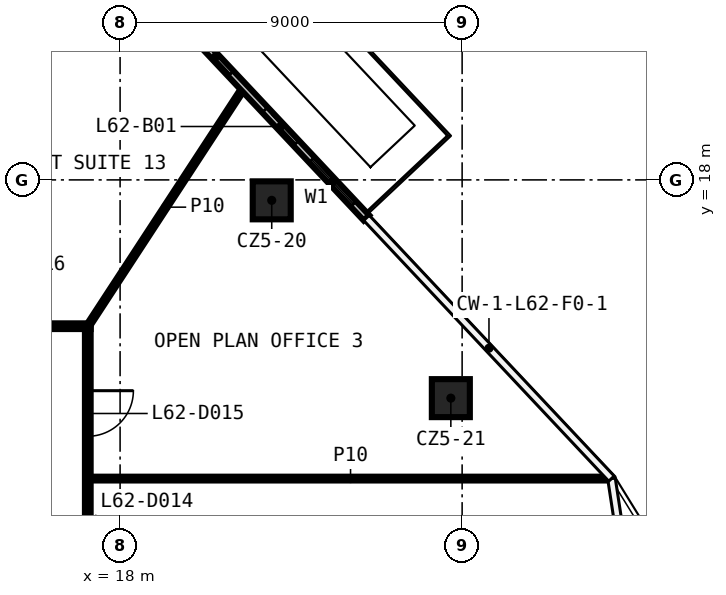
"""IFC4 building model, lengths in metres.
Left out: names, types, materials, properties, quantities, classifications, styles, units other than length and angle.
Written with IfcOpenShell. Run it as: python <this file> out.ifc"""

import sys

from ifc_helpers import new_model, si_unit, direction, frame, frame_2d, origin, origin_2d, place, context, subcontext, project, spatial, rectangle, extrude, element, fill, save


model = new_model("IFC4")
c1 = context("Model", 3, precision=1e-05, world=origin(), true_north=direction((0.0, 1.0)))
c2 = subcontext(c1, "Body", "Model", "MODEL_VIEW")
j1 = project(units=[si_unit("LENGTHUNIT", "METRE"), si_unit("PLANEANGLEUNIT", "RADIAN")], contexts=[c1])
p1 = place(None, origin())
s1 = spatial("IfcSite", under=j1, at=p1, CompositionType="ELEMENT")
p2 = place(p1, origin())
s2 = spatial("IfcBuilding", under=s1, at=p2, CompositionType="ELEMENT")
p3 = place(p2, frame((0.0, 0.0, 294.2)))
s3 = spatial("IfcBuildingStorey", under=s2, at=p3, CompositionType="ELEMENT", Elevation=294.2)
for number, where, z_axis, x_axis in (
    (1, (21.99, 17.462, 0.0), (0.0, 0.0, 1.0), (1.0, 0.0, 0.0)),
    (2, (26.703, 12.257, 0.0), (0.0, 0.0, 1.0), (1.0, 0.0, 0.0)),
):
    element("IfcColumn", number, at=place(p3, frame(where, z_axis=z_axis, x_axis=x_axis)), inside=s3, PredefinedType="COLUMN", context=c2, shape_type="SweptSolid", body=[
        extrude(rectangle(XDim=1.0, YDim=1.0, at=origin_2d()), origin(), (0.0, 0.0, 1.0), 3.82),
    ])
p4 = place(p3, frame((17.225, 10.14, 0.0), z_axis=(0.0, 0.0, 1.0), x_axis=(1.0, 0.0, 0.0)))
e3 = element("IfcWall", 3, at=p4, inside=s3, PredefinedType="PARTITIONING", context=c2, shape_type="SweptSolid", body=[
    extrude(rectangle(XDim=13.677, YDim=0.1, at=frame_2d((6.839, 0.0))), origin(), (0.0, 0.0, 1.0), 3.82),
])
p5 = place(p3, frame((-17.225, 14.15, 0.0), z_axis=(0.0, 0.0, 1.0), x_axis=(1.0, 0.0, 0.0)))
e4 = element("IfcWall", 4, at=p5, inside=s3, PredefinedType="PARTITIONING", context=c2, shape_type="SweptSolid", body=[
    extrude(rectangle(XDim=34.45, YDim=0.15, at=frame_2d((17.225, 0.0))), origin(), (0.0, 0.0, 1.0), 3.82),
])
p6 = place(p5, frame((31.962, 0.0, 0.0)))
e5 = element("IfcOpeningElement", 5, at=p6, cuts=e4, PredefinedType="OPENING", context=c2, shape_type="SweptSolid", body=[
    extrude(rectangle(XDim=1.2, YDim=2.1, at=frame_2d((0.6, 1.05))), frame((0.0, 0.085, 0.0), z_axis=(0.0, -1.0, 0.0), x_axis=(1.0, 0.0, 0.0)), (0.0, 0.0, 1.0), 0.17),
])
p7 = place(p5, frame((26.254, 0.0, 0.0)))
e6 = element("IfcOpeningElement", 6, at=p7, cuts=e4, PredefinedType="OPENING", context=c2, shape_type="SweptSolid", body=[
    extrude(rectangle(XDim=1.2, YDim=2.1, at=frame_2d((0.6, 1.05))), frame((0.0, 0.085, 0.0), z_axis=(0.0, -1.0, 0.0), x_axis=(1.0, 0.0, 0.0)), (0.0, 0.0, 1.0), 0.17),
])
p8 = place(p5, frame((20.032, 0.0, 0.0)))
e7 = element("IfcOpeningElement", 7, at=p8, cuts=e4, PredefinedType="OPENING", context=c2, shape_type="SweptSolid", body=[
    extrude(rectangle(XDim=1.2, YDim=2.1, at=frame_2d((0.6, 1.05))), frame((0.0, 0.085, 0.0), z_axis=(0.0, -1.0, 0.0), x_axis=(1.0, 0.0, 0.0)), (0.0, 0.0, 1.0), 0.17),
])
p9 = place(p5, frame((15.378, 0.0, 0.0)))
e8 = element("IfcOpeningElement", 8, at=p9, cuts=e4, PredefinedType="OPENING", context=c2, shape_type="SweptSolid", body=[
    extrude(rectangle(XDim=1.2, YDim=2.1, at=frame_2d((0.6, 1.05))), frame((0.0, 0.085, 0.0), z_axis=(0.0, -1.0, 0.0), x_axis=(1.0, 0.0, 0.0)), (0.0, 0.0, 1.0), 0.17),
])
p10 = place(p5, frame((10.723, 0.0, 0.0)))
e9 = element("IfcOpeningElement", 9, at=p10, cuts=e4, PredefinedType="OPENING", context=c2, shape_type="SweptSolid", body=[
    extrude(rectangle(XDim=1.2, YDim=2.1, at=frame_2d((0.6, 1.05))), frame((0.0, 0.085, 0.0), z_axis=(0.0, -1.0, 0.0), x_axis=(1.0, 0.0, 0.0)), (0.0, 0.0, 1.0), 0.17),
])
p11 = place(p5, frame((6.073, 0.0, 0.0)))
e10 = element("IfcOpeningElement", 10, at=p11, cuts=e4, PredefinedType="OPENING", context=c2, shape_type="SweptSolid", body=[
    extrude(rectangle(XDim=1.2, YDim=2.1, at=frame_2d((0.6, 1.05))), frame((0.0, 0.085, 0.0), z_axis=(0.0, -1.0, 0.0), x_axis=(1.0, 0.0, 0.0)), (0.0, 0.0, 1.0), 0.17),
])
p12 = place(p5, frame((1.774, 0.0, 0.0)))
e11 = element("IfcOpeningElement", 11, at=p12, cuts=e4, PredefinedType="OPENING", context=c2, shape_type="SweptSolid", body=[
    extrude(rectangle(XDim=1.2, YDim=2.1, at=frame_2d((0.6, 1.05))), frame((0.0, 0.085, 0.0), z_axis=(0.0, -1.0, 0.0), x_axis=(1.0, 0.0, 0.0)), (0.0, 0.0, 1.0), 0.17),
])
p13 = place(p3, frame((17.15, 14.15, 0.0), z_axis=(0.0, 0.0, 1.0), x_axis=(0.547120172247, 0.837054070608, 0.0)))
e12 = element("IfcWall", 12, at=p13, inside=s3, PredefinedType="PARTITIONING", context=c2, shape_type="SweptSolid", body=[
    extrude(rectangle(XDim=7.485, YDim=0.1, at=frame_2d((3.743, 0.0))), origin(), (0.0, 0.0, 1.0), 3.82),
])
p14 = place(p3, frame((17.15, 14.075, 0.0), z_axis=(0.0, 0.0, 1.0), x_axis=(0.0, -1.0, 0.0)))
e13 = element("IfcWall", 13, at=p14, inside=s3, PredefinedType="PARTITIONING", context=c2, shape_type="SweptSolid", body=[
    extrude(rectangle(XDim=28.15, YDim=0.15, at=frame_2d((14.075, 0.0))), origin(), (0.0, 0.0, 1.0), 3.82),
])
p15 = place(p14, frame((24.326, 0.0, 0.0)))
e14 = element("IfcOpeningElement", 14, at=p15, cuts=e13, PredefinedType="OPENING", context=c2, shape_type="SweptSolid", body=[
    extrude(rectangle(XDim=1.2, YDim=2.1, at=frame_2d((0.6, 1.05))), frame((0.0, 0.085, 0.0), z_axis=(0.0, -1.0, 0.0), x_axis=(1.0, 0.0, 0.0)), (0.0, 0.0, 1.0), 0.17),
])
p16 = place(p14, frame((20.22, 0.0, 0.0)))
e15 = element("IfcOpeningElement", 15, at=p16, cuts=e13, PredefinedType="OPENING", context=c2, shape_type="SweptSolid", body=[
    extrude(rectangle(XDim=1.2, YDim=2.1, at=frame_2d((0.6, 1.05))), frame((0.0, 0.085, 0.0), z_axis=(0.0, -1.0, 0.0), x_axis=(1.0, 0.0, 0.0)), (0.0, 0.0, 1.0), 0.17),
])
p17 = place(p14, frame((16.114, 0.0, 0.0)))
e16 = element("IfcOpeningElement", 16, at=p17, cuts=e13, PredefinedType="OPENING", context=c2, shape_type="SweptSolid", body=[
    extrude(rectangle(XDim=1.2, YDim=2.1, at=frame_2d((0.6, 1.05))), frame((0.0, 0.085, 0.0), z_axis=(0.0, -1.0, 0.0), x_axis=(1.0, 0.0, 0.0)), (0.0, 0.0, 1.0), 0.17),
])
p18 = place(p14, frame((12.012, 0.0, 0.0)))
e17 = element("IfcOpeningElement", 17, at=p18, cuts=e13, PredefinedType="OPENING", context=c2, shape_type="SweptSolid", body=[
    extrude(rectangle(XDim=1.2, YDim=2.1, at=frame_2d((0.6, 1.05))), frame((0.0, 0.085, 0.0), z_axis=(0.0, -1.0, 0.0), x_axis=(1.0, 0.0, 0.0)), (0.0, 0.0, 1.0), 0.17),
])
p19 = place(p14, frame((5.504, 0.0, 0.0)))
e18 = element("IfcOpeningElement", 18, at=p19, cuts=e13, PredefinedType="OPENING", context=c2, shape_type="SweptSolid", body=[
    extrude(rectangle(XDim=1.2, YDim=2.1, at=frame_2d((0.6, 1.05))), frame((0.0, 0.085, 0.0), z_axis=(0.0, -1.0, 0.0), x_axis=(1.0, 0.0, 0.0)), (0.0, 0.0, 1.0), 0.17),
])
p20 = place(p14, frame((1.622, 0.0, 0.0)))
e19 = element("IfcOpeningElement", 19, at=p20, cuts=e13, PredefinedType="OPENING", context=c2, shape_type="SweptSolid", body=[
    extrude(rectangle(XDim=1.2, YDim=2.1, at=frame_2d((0.6, 1.05))), frame((0.0, 0.085, 0.0), z_axis=(0.0, -1.0, 0.0), x_axis=(1.0, 0.0, 0.0)), (0.0, 0.0, 1.0), 0.17),
])
p21 = place(p3, frame((24.482, 17.0, 0.0), z_axis=(0.0, 0.0, 1.0), x_axis=(-0.684823965592, 0.728708539919, 0.0)))
e20 = element("IfcWall", 20, at=p21, inside=s3, PredefinedType="SOLIDWALL", context=c2, shape_type="SweptSolid", body=[
    extrude(rectangle(XDim=14.131, YDim=0.2, at=frame_2d((7.065, 0.0))), origin(), (0.0, 0.0, 1.0), 3.82),
])
p22 = place(p21, frame((0.5, 0.0, 0.6)))
e21 = element("IfcOpeningElement", 21, at=p22, cuts=e20, PredefinedType="OPENING", context=c2, shape_type="SweptSolid", body=[
    extrude(rectangle(XDim=1.6, YDim=2.4, at=frame_2d((0.8, 1.2))), frame((0.0, 0.11, 0.0), z_axis=(0.0, -1.0, 0.0), x_axis=(1.0, 0.0, 0.0)), (0.0, 0.0, 1.0), 0.22),
])
p23 = place(p21, frame((2.7, 0.0, 0.0)))
e22 = element("IfcOpeningElement", 22, at=p23, cuts=e20, PredefinedType="OPENING", context=c2, shape_type="SweptSolid", body=[
    extrude(rectangle(XDim=1.2, YDim=2.4, at=frame_2d((0.6, 1.2))), frame((0.0, 0.11, 0.0), z_axis=(0.0, -1.0, 0.0), x_axis=(1.0, 0.0, 0.0)), (0.0, 0.0, 1.0), 0.22),
])
p24 = place(p21, frame((6.71, 0.0, 0.6)))
e23 = element("IfcOpeningElement", 23, at=p24, cuts=e20, PredefinedType="OPENING", context=c2, shape_type="SweptSolid", body=[
    extrude(rectangle(XDim=1.6, YDim=2.4, at=frame_2d((0.8, 1.2))), frame((0.0, 0.11, 0.0), z_axis=(0.0, -1.0, 0.0), x_axis=(1.0, 0.0, 0.0)), (0.0, 0.0, 1.0), 0.22),
])
p25 = place(p21, frame((5.21, 0.0, 0.0)))
e24 = element("IfcOpeningElement", 24, at=p25, cuts=e20, PredefinedType="OPENING", context=c2, shape_type="SweptSolid", body=[
    extrude(rectangle(XDim=1.2, YDim=2.4, at=frame_2d((0.6, 1.2))), frame((0.0, 0.11, 0.0), z_axis=(0.0, -1.0, 0.0), x_axis=(1.0, 0.0, 0.0)), (0.0, 0.0, 1.0), 0.22),
])
p26 = place(p21, frame((11.42, 0.0, 0.6)))
e25 = element("IfcOpeningElement", 25, at=p26, cuts=e20, PredefinedType="OPENING", context=c2, shape_type="SweptSolid", body=[
    extrude(rectangle(XDim=1.6, YDim=2.4, at=frame_2d((0.8, 1.2))), frame((0.0, 0.11, 0.0), z_axis=(0.0, -1.0, 0.0), x_axis=(1.0, 0.0, 0.0)), (0.0, 0.0, 1.0), 0.22),
])
p27 = place(p21, frame((9.92, 0.0, 0.0)))
e26 = element("IfcOpeningElement", 26, at=p27, cuts=e20, PredefinedType="OPENING", context=c2, shape_type="SweptSolid", body=[
    extrude(rectangle(XDim=1.2, YDim=2.4, at=frame_2d((0.6, 1.2))), frame((0.0, 0.11, 0.0), z_axis=(0.0, -1.0, 0.0), x_axis=(1.0, 0.0, 0.0)), (0.0, 0.0, 1.0), 0.22),
])
p28 = place(p20, origin())
e27 = element("IfcDoor", 27, at=p28, inside=s3, OperationType="SINGLE_SWING_RIGHT", PredefinedType="DOOR", context=c2, shape_type="SweptSolid", body=[
    extrude(rectangle(XDim=1.2, YDim=2.1, at=frame_2d((0.6, 1.05))), frame((0.0, 0.025, 0.0), z_axis=(0.0, -1.0, 0.0), x_axis=(1.0, 0.0, 0.0)), (0.0, 0.0, 1.0), 0.05),
])
fill(e19, e27)
p29 = place(p22, origin())
e28 = element("IfcWindow", 28, at=p29, inside=s3, PartitioningType="SINGLE_PANEL", PredefinedType="WINDOW", context=c2, shape_type="SweptSolid", body=[
    extrude(rectangle(XDim=1.6, YDim=2.4, at=frame_2d((0.8, 1.2))), frame((0.0, 0.03, 0.0), z_axis=(0.0, -1.0, 0.0), x_axis=(1.0, 0.0, 0.0)), (0.0, 0.0, 1.0), 0.06),
])
fill(e21, e28)
p30 = place(p23, origin())
e29 = element("IfcDoor", 29, at=p30, inside=s3, OperationType="SLIDING_TO_LEFT", PredefinedType="DOOR", context=c2, shape_type="SweptSolid", body=[
    extrude(rectangle(XDim=1.2, YDim=2.4, at=frame_2d((0.6, 1.2))), frame((0.0, 0.025, 0.0), z_axis=(0.0, -1.0, 0.0), x_axis=(1.0, 0.0, 0.0)), (0.0, 0.0, 1.0), 0.05),
])
fill(e22, e29)
p31 = place(p25, origin())
e30 = element("IfcDoor", 30, at=p31, inside=s3, OperationType="SLIDING_TO_LEFT", PredefinedType="DOOR", context=c2, shape_type="SweptSolid", body=[
    extrude(rectangle(XDim=1.2, YDim=2.4, at=frame_2d((0.6, 1.2))), frame((0.0, 0.025, 0.0), z_axis=(0.0, -1.0, 0.0), x_axis=(1.0, 0.0, 0.0)), (0.0, 0.0, 1.0), 0.05),
])
fill(e24, e30)
save(model, sys.argv[1])
